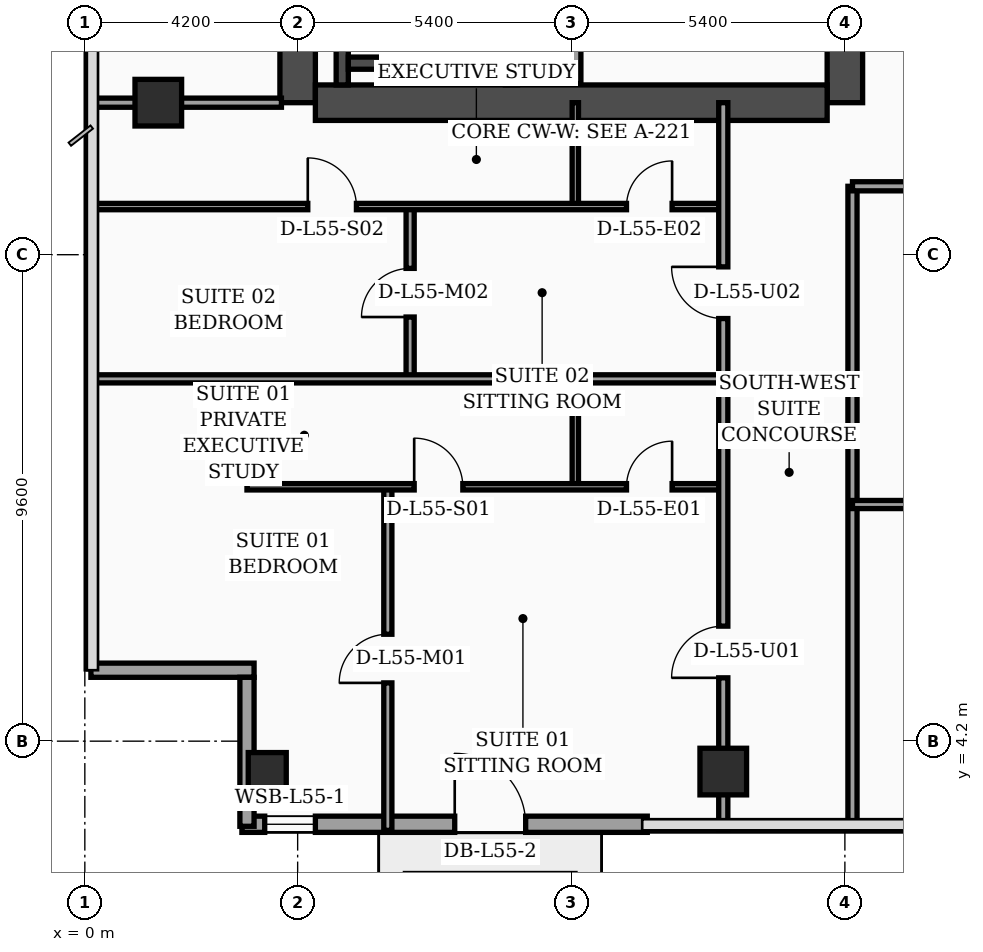
"""IFC4 building model, lengths in metres.
Left out: names, types, materials, properties, quantities, classifications, styles, units other than length and angle.
Written with IfcOpenShell. Run it as: python <this file> out.ifc"""

import sys

from ifc_helpers import new_model, si_unit, direction, frame, frame_2d, origin, origin_2d, place, context, subcontext, project, spatial, rectangle, hollow_rectangle, extrude, element, fill, save


model = new_model("IFC4")
c1 = context("Model", 3, precision=1e-05, world=origin(), true_north=direction((0.0, 1.0)))
c2 = subcontext(c1, "Body", "Model", "MODEL_VIEW")
j1 = project(units=[si_unit("LENGTHUNIT", "METRE"), si_unit("PLANEANGLEUNIT", "RADIAN")], contexts=[c1])
p1 = place(None, origin())
s1 = spatial("IfcSite", under=j1, at=p1, CompositionType="ELEMENT")
p2 = place(p1, origin())
s2 = spatial("IfcBuilding", under=s1, at=p2, CompositionType="ELEMENT")
p3 = place(p2, frame((0.0, 0.0, 223.1)))
s3 = spatial("IfcBuildingStorey", under=s2, at=p3, CompositionType="ELEMENT", Elevation=223.1)
p4 = place(p3, frame((4.2, 16.8, 0.0), z_axis=(0.0, 0.0, 1.0), x_axis=(0.0, 1.0, 0.0)))
e1 = element("IfcWall", 1, at=p4, inside=s3, PredefinedType="SHEAR", context=c2, shape_type="SweptSolid", body=[
    extrude(rectangle(XDim=21.6, YDim=0.7, at=frame_2d((10.8, 0.0))), origin(), (0.0, 0.0, 1.0), 3.56),
])
p5 = place(p3, frame((15.0, 16.8, 0.0), z_axis=(0.0, 0.0, 1.0), x_axis=(0.0, 1.0, 0.0)))
e2 = element("IfcWall", 2, at=p5, inside=s3, PredefinedType="SHEAR", context=c2, shape_type="SweptSolid", body=[
    extrude(rectangle(XDim=21.6, YDim=0.7, at=frame_2d((10.8, 0.0))), origin(), (0.0, 0.0, 1.0), 3.56),
])
p6 = place(p5, frame((8.65, 0.0, 0.0)))
e3 = element("IfcOpeningElement", 3, at=p6, cuts=e2, PredefinedType="OPENING", context=c2, shape_type="SweptSolid", body=[
    extrude(rectangle(XDim=1.1, YDim=2.2, at=frame_2d((0.55, 1.1))), frame((0.0, 0.36, 0.0), z_axis=(0.0, -1.0, 0.0), x_axis=(1.0, 0.0, 0.0)), (0.0, 0.0, 1.0), 0.72),
])
p7 = place(p5, frame((10.85, 0.0, 0.0)))
e4 = element("IfcOpeningElement", 4, at=p7, cuts=e2, PredefinedType="OPENING", context=c2, shape_type="SweptSolid", body=[
    extrude(rectangle(XDim=1.1, YDim=2.2, at=frame_2d((0.55, 1.1))), frame((0.0, 0.36, 0.0), z_axis=(0.0, -1.0, 0.0), x_axis=(1.0, 0.0, 0.0)), (0.0, 0.0, 1.0), 0.72),
])
p8 = place(p5, frame((13.5, 0.0, 0.0)))
e5 = element("IfcOpeningElement", 5, at=p8, cuts=e2, PredefinedType="OPENING", context=c2, shape_type="SweptSolid", body=[
    extrude(rectangle(XDim=1.1, YDim=2.2, at=frame_2d((0.55, 1.1))), frame((0.0, 0.36, 0.0), z_axis=(0.0, -1.0, 0.0), x_axis=(1.0, 0.0, 0.0)), (0.0, 0.0, 1.0), 0.72),
])
p9 = place(p5, frame((16.15, 0.0, 0.0)))
e6 = element("IfcOpeningElement", 6, at=p9, cuts=e2, PredefinedType="OPENING", context=c2, shape_type="SweptSolid", body=[
    extrude(rectangle(XDim=1.1, YDim=2.2, at=frame_2d((0.55, 1.1))), frame((0.0, 0.36, 0.0), z_axis=(0.0, -1.0, 0.0), x_axis=(1.0, 0.0, 0.0)), (0.0, 0.0, 1.0), 0.72),
])
p10 = place(p3, frame((4.55, 16.8, 0.0), z_axis=(0.0, 0.0, 1.0), x_axis=(1.0, 0.0, 0.0)))
e7 = element("IfcWall", 7, at=p10, inside=s3, PredefinedType="SHEAR", context=c2, shape_type="SweptSolid", body=[
    extrude(rectangle(XDim=10.1, YDim=0.7, at=frame_2d((5.05, 0.0))), origin(), (0.0, 0.0, 1.0), 3.56),
])
p11 = place(p3, frame((5.08, 17.15, 0.0), z_axis=(0.0, 0.0, 1.0), x_axis=(0.0, 1.0, 0.0)))
e8 = element("IfcWall", 8, at=p11, inside=s3, PredefinedType="SOLIDWALL", context=c2, shape_type="SweptSolid", body=[
    extrude(rectangle(XDim=9.64, YDim=0.24, at=frame_2d((4.82, 0.0))), origin(), (0.0, 0.0, 1.0), 3.56),
])
p12 = place(p3, frame((8.42, 17.15, 0.0), z_axis=(0.0, 0.0, 1.0), x_axis=(0.0, 1.0, 0.0)))
e9 = element("IfcWall", 9, at=p12, inside=s3, PredefinedType="SOLIDWALL", context=c2, shape_type="SweptSolid", body=[
    extrude(rectangle(XDim=9.64, YDim=0.24, at=frame_2d((4.82, 0.0))), origin(), (0.0, 0.0, 1.0), 3.56),
])
p13 = place(p12, frame((0.35, 0.0, 0.0)))
e10 = element("IfcOpeningElement", 10, at=p13, cuts=e9, PredefinedType="OPENING", context=c2, shape_type="SweptSolid", body=[
    extrude(rectangle(XDim=1.15, YDim=2.2, at=frame_2d((0.575, 1.1))), frame((0.0, 0.13, 0.0), z_axis=(0.0, -1.0, 0.0), x_axis=(1.0, 0.0, 0.0)), (0.0, 0.0, 1.0), 0.26),
])
p14 = place(p3, frame((5.2, 17.58, 0.0), z_axis=(0.0, 0.0, 1.0), x_axis=(1.0, 0.0, 0.0)))
e11 = element("IfcWall", 11, at=p14, inside=s3, PredefinedType="SOLIDWALL", context=c2, shape_type="SweptSolid", body=[
    extrude(rectangle(XDim=3.1, YDim=0.24, at=frame_2d((1.55, 0.0))), origin(), (0.0, 0.0, 1.0), 3.56),
])
p15 = place(p3, frame((3.6, 3.6, 0.0), z_axis=(0.0, 0.0, 1.0), x_axis=(1.0, 0.0, 0.0)))
e12 = element("IfcColumn", 12, at=p15, inside=s3, PredefinedType="COLUMN", context=c2, shape_type="SweptSolid", body=[
    extrude(hollow_rectangle(XDim=0.75, YDim=0.75, WallThickness=0.032, at=origin_2d()), origin(), (0.0, 0.0, 1.0), 3.56),
])
for number, where, z_axis, x_axis in (
    (13, (1.45, 16.8, 0.0), (0.0, 0.0, 1.0), (1.0, 0.0, 0.0)),
    (14, (12.6, 3.6, 0.0), (0.0, 0.0, 1.0), (1.0, 0.0, 0.0)),
):
    element("IfcColumn", number, at=place(p3, frame(where, z_axis=z_axis, x_axis=x_axis)), inside=s3, PredefinedType="COLUMN", context=c2, shape_type="SweptSolid", body=[
        extrude(rectangle(XDim=0.92, YDim=0.92, at=origin_2d()), origin(), (0.0, 0.0, 1.0), 3.56),
    ])
p16 = place(p3, frame((3.1, 2.56, 0.0), z_axis=(0.0, 0.0, 1.0), x_axis=(1.0, 0.0, 0.0)))
e15 = element("IfcWall", 15, at=p16, inside=s3, PredefinedType="SOLIDWALL", context=c2, shape_type="SweptSolid", body=[
    extrude(rectangle(XDim=8.0, YDim=0.32, at=frame_2d((4.0, 0.0))), origin(), (0.0, 0.0, 1.0), 3.56),
])
p17 = place(p16, frame((0.45, 0.0, 0.75)))
e16 = element("IfcOpeningElement", 16, at=p17, cuts=e15, PredefinedType="OPENING", context=c2, shape_type="SweptSolid", body=[
    extrude(rectangle(XDim=1.0, YDim=1.6, at=frame_2d((0.5, 0.8))), frame((0.0, 0.17, 0.0), z_axis=(0.0, -1.0, 0.0), x_axis=(1.0, 0.0, 0.0)), (0.0, 0.0, 1.0), 0.34),
])
p18 = place(p16, frame((4.2, 0.0, 0.0)))
e17 = element("IfcOpeningElement", 17, at=p18, cuts=e15, PredefinedType="OPENING", context=c2, shape_type="SweptSolid", body=[
    extrude(rectangle(XDim=1.4, YDim=2.25, at=frame_2d((0.7, 1.125))), frame((0.0, 0.17, 0.0), z_axis=(0.0, -1.0, 0.0), x_axis=(1.0, 0.0, 0.0)), (0.0, 0.0, 1.0), 0.34),
])
p19 = place(p3, frame((0.12, 5.6, 0.0), z_axis=(0.0, 0.0, 1.0), x_axis=(1.0, 0.0, 0.0)))
e18 = element("IfcWall", 18, at=p19, inside=s3, PredefinedType="SOLIDWALL", context=c2, shape_type="SweptSolid", body=[
    extrude(rectangle(XDim=3.22, YDim=0.28, at=frame_2d((1.61, 0.0))), origin(), (0.0, 0.0, 1.0), 2.94),
])
p20 = place(p3, frame((3.2, 5.46, 0.0), z_axis=(0.0, 0.0, 1.0), x_axis=(0.0, -1.0, 0.0)))
e19 = element("IfcWall", 19, at=p20, inside=s3, PredefinedType="SOLIDWALL", context=c2, shape_type="SweptSolid", body=[
    extrude(rectangle(XDim=2.94, YDim=0.28, at=frame_2d((1.47, 0.0))), origin(), (0.0, 0.0, 1.0), 2.94),
])
p21 = place(p3, frame((9.68, 17.17, 0.0), z_axis=(0.0, 0.0, 1.0), x_axis=(0.0, 1.0, 0.0)))
e20 = element("IfcWall", 20, at=p21, inside=s3, PredefinedType="SOLIDWALL", context=c2, shape_type="SweptSolid", body=[
    extrude(rectangle(XDim=7.83, YDim=0.22, at=frame_2d((3.915, 0.0))), origin(), (0.0, 0.0, 1.0), 3.56),
])
p22 = place(p3, frame((0.08, 16.8, 0.0), z_axis=(0.0, 0.0, 1.0), x_axis=(1.0, 0.0, 0.0)))
e21 = element("IfcWall", 21, at=p22, inside=s3, PredefinedType="PARTITIONING", context=c2, shape_type="SweptSolid", body=[
    extrude(rectangle(XDim=3.8, YDim=0.18, at=frame_2d((1.9, 0.0))), origin(), (0.0, 0.0, 1.0), 2.94),
])
p23 = place(p3, frame((9.68, 9.22, 0.0), z_axis=(0.0, 0.0, 1.0), x_axis=(0.0, 1.0, 0.0)))
e22 = element("IfcWall", 22, at=p23, inside=s3, PredefinedType="PARTITIONING", context=c2, shape_type="SweptSolid", body=[
    extrude(rectangle(XDim=2.13, YDim=0.125, at=frame_2d((1.065, 0.0))), origin(), (0.0, 0.0, 1.0), 3.09),
])
p24 = place(p3, frame((5.98, 2.44, 0.0), z_axis=(0.0, 0.0, 1.0), x_axis=(0.0, 1.0, 0.0)))
e23 = element("IfcWall", 23, at=p24, inside=s3, PredefinedType="PARTITIONING", context=c2, shape_type="SweptSolid", body=[
    extrude(rectangle(XDim=6.78, YDim=0.16, at=frame_2d((3.39, 0.0))), origin(), (0.0, 0.0, 1.0), 3.09),
])
p25 = place(p24, frame((2.91, 0.0, 0.0)))
e24 = element("IfcOpeningElement", 24, at=p25, cuts=e23, PredefinedType="OPENING", context=c2, shape_type="SweptSolid", body=[
    extrude(rectangle(XDim=0.96, YDim=2.2, at=frame_2d((0.48, 1.1))), frame((0.0, 0.09, 0.0), z_axis=(0.0, -1.0, 0.0), x_axis=(1.0, 0.0, 0.0)), (0.0, 0.0, 1.0), 0.18),
])
p26 = place(p3, frame((3.2, 9.22, 0.0), z_axis=(0.0, 0.0, 1.0), x_axis=(1.0, 0.0, 0.0)))
e25 = element("IfcWall", 25, at=p26, inside=s3, PredefinedType="PARTITIONING", context=c2, shape_type="SweptSolid", body=[
    extrude(rectangle(XDim=9.4, YDim=0.125, at=frame_2d((4.7, 0.0))), origin(), (0.0, 0.0, 1.0), 2.94),
])
p27 = place(p26, frame((3.3, 0.0, 0.0)))
e26 = element("IfcOpeningElement", 26, at=p27, cuts=e25, PredefinedType="OPENING", context=c2, shape_type="SweptSolid", body=[
    extrude(rectangle(XDim=0.96, YDim=2.2, at=frame_2d((0.48, 1.1))), frame((0.0, 0.073, 0.0), z_axis=(0.0, -1.0, 0.0), x_axis=(1.0, 0.0, 0.0)), (0.0, 0.0, 1.0), 0.145),
])
p28 = place(p26, frame((7.49, 0.0, 0.0)))
e27 = element("IfcOpeningElement", 27, at=p28, cuts=e25, PredefinedType="OPENING", context=c2, shape_type="SweptSolid", body=[
    extrude(rectangle(XDim=0.9, YDim=2.15, at=frame_2d((0.45, 1.075))), frame((0.0, 0.073, 0.0), z_axis=(0.0, -1.0, 0.0), x_axis=(1.0, 0.0, 0.0)), (0.0, 0.0, 1.0), 0.145),
])
p29 = place(p3, frame((9.68, 14.75, 0.0), z_axis=(0.0, 0.0, 1.0), x_axis=(0.0, 1.0, 0.0)))
e28 = element("IfcWall", 28, at=p29, inside=s3, PredefinedType="PARTITIONING", context=c2, shape_type="SweptSolid", body=[
    extrude(rectangle(XDim=2.05, YDim=0.125, at=frame_2d((1.025, 0.0))), origin(), (0.0, 0.0, 1.0), 3.56),
])
p30 = place(p3, frame((6.42, 11.35, 0.0), z_axis=(0.0, 0.0, 1.0), x_axis=(0.0, 1.0, 0.0)))
e29 = element("IfcWall", 29, at=p30, inside=s3, PredefinedType="PARTITIONING", context=c2, shape_type="SweptSolid", body=[
    extrude(rectangle(XDim=3.4, YDim=0.16, at=frame_2d((1.7, 0.0))), origin(), (0.0, 0.0, 1.0), 3.56),
])
p31 = place(p30, frame((1.22, 0.0, 0.0)))
e30 = element("IfcOpeningElement", 30, at=p31, cuts=e29, PredefinedType="OPENING", context=c2, shape_type="SweptSolid", body=[
    extrude(rectangle(XDim=0.96, YDim=2.2, at=frame_2d((0.48, 1.1))), frame((0.0, 0.09, 0.0), z_axis=(0.0, -1.0, 0.0), x_axis=(1.0, 0.0, 0.0)), (0.0, 0.0, 1.0), 0.18),
])
p32 = place(p3, frame((0.08, 14.75, 0.0), z_axis=(0.0, 0.0, 1.0), x_axis=(1.0, 0.0, 0.0)))
e31 = element("IfcWall", 31, at=p32, inside=s3, PredefinedType="PARTITIONING", context=c2, shape_type="SweptSolid", body=[
    extrude(rectangle(XDim=12.52, YDim=0.125, at=frame_2d((6.26, 0.0))), origin(), (0.0, 0.0, 1.0), 2.94),
])
p33 = place(p32, frame((4.32, 0.0, 0.0)))
e32 = element("IfcOpeningElement", 32, at=p33, cuts=e31, PredefinedType="OPENING", context=c2, shape_type="SweptSolid", body=[
    extrude(rectangle(XDim=0.96, YDim=2.2, at=frame_2d((0.48, 1.1))), frame((0.0, 0.073, 0.0), z_axis=(0.0, -1.0, 0.0), x_axis=(1.0, 0.0, 0.0)), (0.0, 0.0, 1.0), 0.145),
])
p34 = place(p32, frame((10.61, 0.0, 0.0)))
e33 = element("IfcOpeningElement", 33, at=p34, cuts=e31, PredefinedType="OPENING", context=c2, shape_type="SweptSolid", body=[
    extrude(rectangle(XDim=0.9, YDim=2.15, at=frame_2d((0.45, 1.075))), frame((0.0, 0.073, 0.0), z_axis=(0.0, -1.0, 0.0), x_axis=(1.0, 0.0, 0.0)), (0.0, 0.0, 1.0), 0.145),
])
p35 = place(p3, frame((0.08, 11.35, 0.0), z_axis=(0.0, 0.0, 1.0), x_axis=(1.0, 0.0, 0.0)))
e34 = element("IfcWall", 34, at=p35, inside=s3, PredefinedType="PARTITIONING", context=c2, shape_type="SweptSolid", body=[
    extrude(rectangle(XDim=12.52, YDim=0.16, at=frame_2d((6.26, 0.0))), origin(), (0.0, 0.0, 1.0), 2.94),
])
p36 = place(p3, frame((12.6, 2.44, 0.0), z_axis=(0.0, 0.0, 1.0), x_axis=(0.0, 1.0, 0.0)))
e35 = element("IfcWall", 35, at=p36, inside=s3, PredefinedType="PARTITIONING", context=c2, shape_type="SweptSolid", body=[
    extrude(rectangle(XDim=14.36, YDim=0.18, at=frame_2d((7.18, 0.0))), origin(), (0.0, 0.0, 1.0), 2.94),
])
p37 = place(p36, frame((3.01, 0.0, 0.0)))
e36 = element("IfcOpeningElement", 36, at=p37, cuts=e35, PredefinedType="OPENING", context=c2, shape_type="SweptSolid", body=[
    extrude(rectangle(XDim=1.02, YDim=2.2, at=frame_2d((0.51, 1.1))), frame((0.0, 0.1, 0.0), z_axis=(0.0, -1.0, 0.0), x_axis=(1.0, 0.0, 0.0)), (0.0, 0.0, 1.0), 0.2),
])
p38 = place(p36, frame((10.1, 0.0, 0.0)))
e37 = element("IfcOpeningElement", 37, at=p38, cuts=e35, PredefinedType="OPENING", context=c2, shape_type="SweptSolid", body=[
    extrude(rectangle(XDim=1.02, YDim=2.2, at=frame_2d((0.51, 1.1))), frame((0.0, 0.1, 0.0), z_axis=(0.0, -1.0, 0.0), x_axis=(1.0, 0.0, 0.0)), (0.0, 0.0, 1.0), 0.2),
])
p39 = place(p3, frame((15.15, 2.44, 0.0), z_axis=(0.0, 0.0, 1.0), x_axis=(0.0, 1.0, 0.0)))
e38 = element("IfcWall", 38, at=p39, inside=s3, PredefinedType="PARTITIONING", context=c2, shape_type="SweptSolid", body=[
    extrude(rectangle(XDim=12.71, YDim=0.18, at=frame_2d((6.355, 0.0))), origin(), (0.0, 0.0, 1.0), 3.09),
])
p40 = place(p3, frame((15.15, 8.87, 0.0), z_axis=(0.0, 0.0, 1.0), x_axis=(1.0, 0.0, 0.0)))
e39 = element("IfcWall", 39, at=p40, inside=s3, PredefinedType="PARTITIONING", context=c2, shape_type="SweptSolid", body=[
    extrude(rectangle(XDim=4.45, YDim=0.16, at=frame_2d((2.225, 0.0))), origin(), (0.0, 0.0, 1.0), 3.56),
])
p41 = place(p40, frame((1.75, 0.0, 0.0)))
e40 = element("IfcOpeningElement", 40, at=p41, cuts=e39, PredefinedType="OPENING", context=c2, shape_type="SweptSolid", body=[
    extrude(rectangle(XDim=0.96, YDim=2.2, at=frame_2d((0.48, 1.1))), frame((0.0, 0.09, 0.0), z_axis=(0.0, -1.0, 0.0), x_axis=(1.0, 0.0, 0.0)), (0.0, 0.0, 1.0), 0.18),
])
p42 = place(p3, frame((15.15, 15.15, 0.0), z_axis=(0.0, 0.0, 1.0), x_axis=(1.0, 0.0, 0.0)))
e41 = element("IfcWall", 41, at=p42, inside=s3, PredefinedType="PARTITIONING", context=c2, shape_type="SweptSolid", body=[
    extrude(rectangle(XDim=6.45, YDim=0.18, at=frame_2d((3.225, 0.0))), origin(), (0.0, 0.0, 1.0), 2.59),
])
p43 = place(p42, frame((1.74, 0.0, 0.0)))
e42 = element("IfcOpeningElement", 42, at=p43, cuts=e41, PredefinedType="OPENING", context=c2, shape_type="SweptSolid", body=[
    extrude(rectangle(XDim=1.02, YDim=2.2, at=frame_2d((0.51, 1.1))), frame((0.0, 0.1, 0.0), z_axis=(0.0, -1.0, 0.0), x_axis=(1.0, 0.0, 0.0)), (0.0, 0.0, 1.0), 0.2),
])
p44 = place(p17, origin())
e43 = element("IfcWindow", 43, at=p44, inside=s3, PartitioningType="SINGLE_PANEL", PredefinedType="WINDOW", context=c2, shape_type="SweptSolid", body=[
    extrude(rectangle(XDim=1.0, YDim=1.6, at=frame_2d((0.5, 0.8))), frame((0.0, 0.03, 0.0), z_axis=(0.0, -1.0, 0.0), x_axis=(1.0, 0.0, 0.0)), (0.0, 0.0, 1.0), 0.06),
])
fill(e16, e43)
p45 = place(p18, origin())
e44 = element("IfcDoor", 44, at=p45, inside=s3, OperationType="SINGLE_SWING_LEFT", PredefinedType="DOOR", context=c2, shape_type="SweptSolid", body=[
    extrude(rectangle(XDim=1.4, YDim=2.25, at=frame_2d((0.7, 1.125))), frame((0.0, 0.025, 0.0), z_axis=(0.0, -1.0, 0.0), x_axis=(1.0, 0.0, 0.0)), (0.0, 0.0, 1.0), 0.05),
])
fill(e17, e44)
p46 = place(p25, origin())
e45 = element("IfcDoor", 45, at=p46, inside=s3, OperationType="SINGLE_SWING_LEFT", PredefinedType="DOOR", context=c2, shape_type="SweptSolid", body=[
    extrude(rectangle(XDim=0.96, YDim=2.2, at=frame_2d((0.48, 1.1))), frame((0.0, 0.025, 0.0), z_axis=(0.0, -1.0, 0.0), x_axis=(1.0, 0.0, 0.0)), (0.0, 0.0, 1.0), 0.05),
])
fill(e24, e45)
p47 = place(p27, origin())
e46 = element("IfcDoor", 46, at=p47, inside=s3, OperationType="SINGLE_SWING_LEFT", PredefinedType="DOOR", context=c2, shape_type="SweptSolid", body=[
    extrude(rectangle(XDim=0.96, YDim=2.2, at=frame_2d((0.48, 1.1))), frame((0.0, 0.025, 0.0), z_axis=(0.0, -1.0, 0.0), x_axis=(1.0, 0.0, 0.0)), (0.0, 0.0, 1.0), 0.05),
])
fill(e26, e46)
p48 = place(p28, origin())
e47 = element("IfcDoor", 47, at=p48, inside=s3, OperationType="SINGLE_SWING_RIGHT", PredefinedType="DOOR", context=c2, shape_type="SweptSolid", body=[
    extrude(rectangle(XDim=0.9, YDim=2.15, at=frame_2d((0.45, 1.075))), frame((0.0, 0.025, 0.0), z_axis=(0.0, -1.0, 0.0), x_axis=(1.0, 0.0, 0.0)), (0.0, 0.0, 1.0), 0.05),
])
fill(e27, e47)
p49 = place(p31, origin())
e48 = element("IfcDoor", 48, at=p49, inside=s3, OperationType="SINGLE_SWING_LEFT", PredefinedType="DOOR", context=c2, shape_type="SweptSolid", body=[
    extrude(rectangle(XDim=0.96, YDim=2.2, at=frame_2d((0.48, 1.1))), frame((0.0, 0.025, 0.0), z_axis=(0.0, -1.0, 0.0), x_axis=(1.0, 0.0, 0.0)), (0.0, 0.0, 1.0), 0.05),
])
fill(e30, e48)
p50 = place(p33, origin())
e49 = element("IfcDoor", 49, at=p50, inside=s3, OperationType="SINGLE_SWING_LEFT", PredefinedType="DOOR", context=c2, shape_type="SweptSolid", body=[
    extrude(rectangle(XDim=0.96, YDim=2.2, at=frame_2d((0.48, 1.1))), frame((0.0, 0.025, 0.0), z_axis=(0.0, -1.0, 0.0), x_axis=(1.0, 0.0, 0.0)), (0.0, 0.0, 1.0), 0.05),
])
fill(e32, e49)
p51 = place(p34, origin())
e50 = element("IfcDoor", 50, at=p51, inside=s3, OperationType="SINGLE_SWING_RIGHT", PredefinedType="DOOR", context=c2, shape_type="SweptSolid", body=[
    extrude(rectangle(XDim=0.9, YDim=2.15, at=frame_2d((0.45, 1.075))), frame((0.0, 0.025, 0.0), z_axis=(0.0, -1.0, 0.0), x_axis=(1.0, 0.0, 0.0)), (0.0, 0.0, 1.0), 0.05),
])
fill(e33, e50)
p52 = place(p37, origin())
e51 = element("IfcDoor", 51, at=p52, inside=s3, OperationType="SINGLE_SWING_LEFT", PredefinedType="DOOR", context=c2, shape_type="SweptSolid", body=[
    extrude(rectangle(XDim=1.02, YDim=2.2, at=frame_2d((0.51, 1.1))), frame((0.0, 0.025, 0.0), z_axis=(0.0, -1.0, 0.0), x_axis=(1.0, 0.0, 0.0)), (0.0, 0.0, 1.0), 0.05),
])
fill(e36, e51)
p53 = place(p38, origin())
e52 = element("IfcDoor", 52, at=p53, inside=s3, OperationType="SINGLE_SWING_RIGHT", PredefinedType="DOOR", context=c2, shape_type="SweptSolid", body=[
    extrude(rectangle(XDim=1.02, YDim=2.2, at=frame_2d((0.51, 1.1))), frame((0.0, 0.025, 0.0), z_axis=(0.0, -1.0, 0.0), x_axis=(1.0, 0.0, 0.0)), (0.0, 0.0, 1.0), 0.05),
])
fill(e37, e52)
p54 = place(p13, origin())
e53 = element("IfcDoor", 53, at=p54, inside=s3, OperationType="SINGLE_SWING_LEFT", PredefinedType="DOOR", context=c2, shape_type="SweptSolid", body=[
    extrude(rectangle(XDim=1.15, YDim=2.2, at=frame_2d((0.575, 1.1))), frame((0.0, 0.025, 0.0), z_axis=(0.0, -1.0, 0.0), x_axis=(1.0, 0.0, 0.0)), (0.0, 0.0, 1.0), 0.05),
])
fill(e10, e53)
save(model, sys.argv[1])
